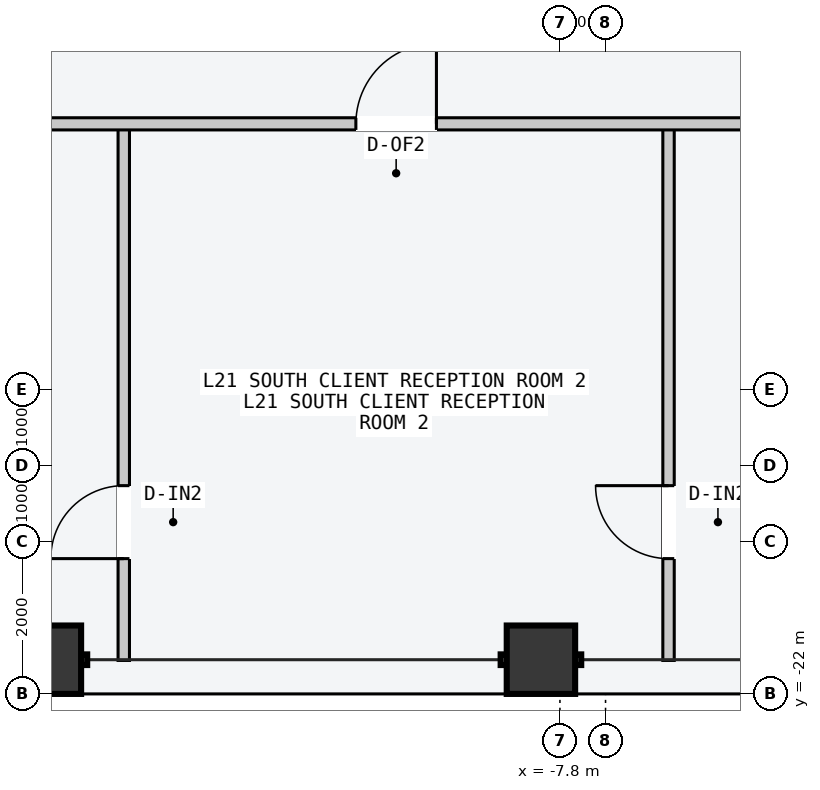
"""IFC4 building model, lengths in metres.
Left out: names, types, materials, properties, quantities, classifications, styles, units other than length and angle.
Written with IfcOpenShell. Run it as: python <this file> out.ifc"""

import sys

from ifc_helpers import new_model, si_unit, direction, frame, frame_2d, origin, origin_2d, place, context, subcontext, project, spatial, rectangle, hollow_rectangle, extrude, element, fill, save


model = new_model("IFC4")
c1 = context("Model", 3, precision=1e-05, world=origin(), true_north=direction((0.0, 1.0)))
c2 = subcontext(c1, "Body", "Model", "MODEL_VIEW")
j1 = project(units=[si_unit("LENGTHUNIT", "METRE"), si_unit("PLANEANGLEUNIT", "RADIAN")], contexts=[c1])
p1 = place(None, origin())
s1 = spatial("IfcSite", under=j1, at=p1, CompositionType="ELEMENT")
p2 = place(p1, origin())
s2 = spatial("IfcBuilding", under=s1, at=p2, CompositionType="ELEMENT")
p3 = place(p2, frame((0.0, 0.0, 82.8)))
s3 = spatial("IfcBuildingStorey", under=s2, at=p3, CompositionType="ELEMENT", Elevation=82.8)
for number, where, z_axis, x_axis in (
    (1, (-14.55, -21.55, 0.0), (0.0, 0.0, 1.0), (1.0, 0.0, 0.0)),
    (2, (-8.05, -21.55, 0.0), (0.0, 0.0, 1.0), (1.0, 0.0, 0.0)),
):
    element("IfcColumn", number, at=place(p3, frame(where, z_axis=z_axis, x_axis=x_axis)), inside=s3, PredefinedType="COLUMN", context=c2, shape_type="SweptSolid", body=[
        extrude(hollow_rectangle(XDim=0.9, YDim=0.9, WallThickness=0.045, at=origin_2d()), origin(), (0.0, 0.0, 1.0), 4.5),
    ])
p4 = place(p3, frame((-13.539, -21.56, 0.0), z_axis=(0.0, 0.0, 1.0), x_axis=(0.0, 1.0, 0.0)))
e3 = element("IfcWall", 3, at=p4, inside=s3, PredefinedType="PARTITIONING", context=c2, shape_type="SweptSolid", body=[
    extrude(rectangle(XDim=7.0, YDim=0.15, at=frame_2d((3.5, 0.0))), origin(), (0.0, 0.0, 1.0), 4.3),
])
p5 = place(p4, frame((1.34, 0.0, 0.0)))
e4 = element("IfcOpeningElement", 4, at=p5, cuts=e3, PredefinedType="OPENING", context=c2, shape_type="SweptSolid", body=[
    extrude(rectangle(XDim=0.96, YDim=2.18, at=frame_2d((0.48, 1.09))), frame((0.0, 0.085, 0.0), z_axis=(0.0, -1.0, 0.0), x_axis=(1.0, 0.0, 0.0)), (0.0, 0.0, 1.0), 0.17),
])
p6 = place(p3, frame((-6.371, -21.56, 0.0), z_axis=(0.0, 0.0, 1.0), x_axis=(0.0, 1.0, 0.0)))
e5 = element("IfcWall", 5, at=p6, inside=s3, PredefinedType="PARTITIONING", context=c2, shape_type="SweptSolid", body=[
    extrude(rectangle(XDim=7.0, YDim=0.15, at=frame_2d((3.5, 0.0))), origin(), (0.0, 0.0, 1.0), 4.3),
])
p7 = place(p6, frame((1.34, 0.0, 0.0)))
e6 = element("IfcOpeningElement", 6, at=p7, cuts=e5, PredefinedType="OPENING", context=c2, shape_type="SweptSolid", body=[
    extrude(rectangle(XDim=0.96, YDim=2.18, at=frame_2d((0.48, 1.09))), frame((0.0, 0.085, 0.0), z_axis=(0.0, -1.0, 0.0), x_axis=(1.0, 0.0, 0.0)), (0.0, 0.0, 1.0), 0.17),
])
p8 = place(p3, frame((-18.0, -14.5, 0.0), z_axis=(0.0, 0.0, 1.0), x_axis=(1.0, 0.0, 0.0)))
e7 = element("IfcWall", 7, at=p8, inside=s3, PredefinedType="PARTITIONING", context=c2, shape_type="SweptSolid", body=[
    extrude(rectangle(XDim=36.0, YDim=0.16, at=frame_2d((18.0, 0.0))), origin(), (0.0, 0.0, 1.0), 4.3),
])
p9 = place(p8, frame((1.721, 0.0, 0.0)))
e8 = element("IfcOpeningElement", 8, at=p9, cuts=e7, PredefinedType="OPENING", context=c2, shape_type="SweptSolid", body=[
    extrude(rectangle(XDim=1.02, YDim=2.2, at=frame_2d((0.51, 1.1))), frame((0.0, 0.09, 0.0), z_axis=(0.0, -1.0, 0.0), x_axis=(1.0, 0.0, 0.0)), (0.0, 0.0, 1.0), 0.18),
])
p10 = place(p8, frame((7.515, 0.0, 0.0)))
e9 = element("IfcOpeningElement", 9, at=p10, cuts=e7, PredefinedType="OPENING", context=c2, shape_type="SweptSolid", body=[
    extrude(rectangle(XDim=1.06, YDim=2.2, at=frame_2d((0.53, 1.1))), frame((0.0, 0.09, 0.0), z_axis=(0.0, -1.0, 0.0), x_axis=(1.0, 0.0, 0.0)), (0.0, 0.0, 1.0), 0.18),
])
p11 = place(p8, frame((14.991, 0.0, 0.0)))
e10 = element("IfcOpeningElement", 10, at=p11, cuts=e7, PredefinedType="OPENING", context=c2, shape_type="SweptSolid", body=[
    extrude(rectangle(XDim=1.24, YDim=2.24, at=frame_2d((0.62, 1.12))), frame((0.0, 0.09, 0.0), z_axis=(0.0, -1.0, 0.0), x_axis=(1.0, 0.0, 0.0)), (0.0, 0.0, 1.0), 0.18),
])
p12 = place(p8, frame((23.273, 0.0, 0.0)))
e11 = element("IfcOpeningElement", 11, at=p12, cuts=e7, PredefinedType="OPENING", context=c2, shape_type="SweptSolid", body=[
    extrude(rectangle(XDim=1.4, YDim=2.2, at=frame_2d((0.7, 1.1))), frame((0.0, 0.09, 0.0), z_axis=(0.0, -1.0, 0.0), x_axis=(1.0, 0.0, 0.0)), (0.0, 0.0, 1.0), 0.18),
])
p13 = place(p8, frame((31.727, 0.0, 0.0)))
e12 = element("IfcOpeningElement", 12, at=p13, cuts=e7, PredefinedType="OPENING", context=c2, shape_type="SweptSolid", body=[
    extrude(rectangle(XDim=0.9, YDim=2.15, at=frame_2d((0.45, 1.075))), frame((0.0, 0.09, 0.0), z_axis=(0.0, -1.0, 0.0), x_axis=(1.0, 0.0, 0.0)), (0.0, 0.0, 1.0), 0.18),
])
p14 = place(p5, origin())
e13 = element("IfcDoor", 13, at=p14, inside=s3, OperationType="SINGLE_SWING_LEFT", PredefinedType="DOOR", context=c2, shape_type="SweptSolid", body=[
    extrude(rectangle(XDim=0.96, YDim=2.18, at=frame_2d((0.48, 1.09))), frame((0.0, 0.025, 0.0), z_axis=(0.0, -1.0, 0.0), x_axis=(1.0, 0.0, 0.0)), (0.0, 0.0, 1.0), 0.05),
])
fill(e4, e13)
p15 = place(p7, origin())
e14 = element("IfcDoor", 14, at=p15, inside=s3, OperationType="SINGLE_SWING_RIGHT", PredefinedType="DOOR", context=c2, shape_type="SweptSolid", body=[
    extrude(rectangle(XDim=0.96, YDim=2.18, at=frame_2d((0.48, 1.09))), frame((0.0, 0.025, 0.0), z_axis=(0.0, -1.0, 0.0), x_axis=(1.0, 0.0, 0.0)), (0.0, 0.0, 1.0), 0.05),
])
fill(e6, e14)
p16 = place(p10, origin())
e15 = element("IfcDoor", 15, at=p16, inside=s3, OperationType="SINGLE_SWING_RIGHT", PredefinedType="DOOR", context=c2, shape_type="SweptSolid", body=[
    extrude(rectangle(XDim=1.06, YDim=2.2, at=frame_2d((0.53, 1.1))), frame((0.0, 0.025, 0.0), z_axis=(0.0, -1.0, 0.0), x_axis=(1.0, 0.0, 0.0)), (0.0, 0.0, 1.0), 0.05),
])
fill(e9, e15)
save(model, sys.argv[1])
